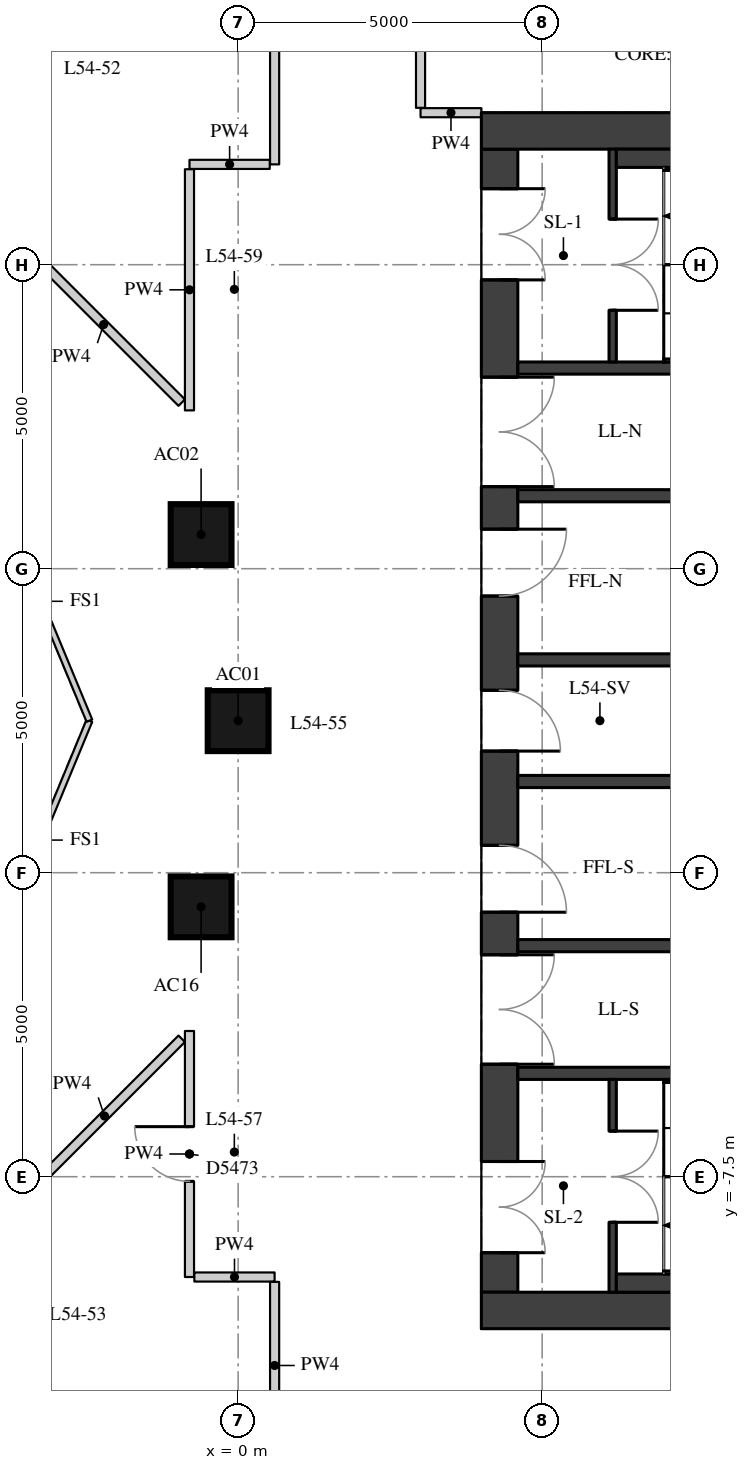
"""IFC4 building model, lengths in metres.
Left out: names, types, materials, properties, quantities, classifications, styles, units other than length and angle.
Written with IfcOpenShell. Run it as: python <this file> out.ifc"""

import sys

from ifc_helpers import new_model, si_unit, direction, frame, frame_2d, origin, origin_2d, place, context, subcontext, project, spatial, rectangle, extrude, element, fill, save


model = new_model("IFC4")
c1 = context("Model", 3, precision=1e-05, world=origin(), true_north=direction((0.0, 1.0)))
c2 = subcontext(c1, "Body", "Model", "MODEL_VIEW")
j1 = project(units=[si_unit("LENGTHUNIT", "METRE"), si_unit("PLANEANGLEUNIT", "RADIAN")], contexts=[c1])
p1 = place(None, origin())
s1 = spatial("IfcSite", under=j1, at=p1, CompositionType="ELEMENT")
p2 = place(p1, origin())
s2 = spatial("IfcBuilding", under=s1, at=p2, CompositionType="ELEMENT")
p3 = place(p2, frame((0.0, 0.0, 192.5)))
s3 = spatial("IfcBuildingStorey", under=s2, at=p3, CompositionType="ELEMENT", Elevation=192.5)
for number, where, z_axis, x_axis in (
    (1, (0.0, 0.0, 0.0), (0.0, 0.0, 1.0), (1.0, 0.0, 0.0)),
    (2, (-0.609, 3.062, 0.0), (0.0, 0.0, 1.0), (1.0, 0.0, 0.0)),
    (3, (-0.609, -3.062, 0.0), (0.0, 0.0, 1.0), (1.0, 0.0, 0.0)),
):
    element("IfcColumn", number, at=place(p3, frame(where, z_axis=z_axis, x_axis=x_axis)), inside=s3, PredefinedType="COLUMN", context=c2, shape_type="SweptSolid", body=[
        extrude(rectangle(XDim=1.0, YDim=1.0, at=origin_2d()), origin(), (0.0, 0.0, 1.0), 3.3),
    ])
p4 = place(p3, frame((4.3, -9.4, 0.0), z_axis=(0.0, 0.0, 1.0), x_axis=(0.0, 1.0, 0.0)))
e4 = element("IfcWall", 4, at=p4, inside=s3, PredefinedType="SHEAR", context=c2, shape_type="SweptSolid", body=[
    extrude(rectangle(XDim=18.8, YDim=0.6, at=frame_2d((9.4, 0.0))), origin(), (0.0, 0.0, 1.0), 3.02),
])
p5 = place(p4, frame((0.65, 0.0, 0.0)))
e5 = element("IfcOpeningElement", 5, at=p5, cuts=e4, PredefinedType="OPENING", context=c2, shape_type="SweptSolid", body=[
    extrude(rectangle(XDim=1.5, YDim=2.1, at=frame_2d((0.75, 1.05))), frame((0.0, 0.31, 0.0), z_axis=(0.0, -1.0, 0.0), x_axis=(1.0, 0.0, 0.0)), (0.0, 0.0, 1.0), 0.62),
])
p6 = place(p4, frame((3.75, 0.0, 0.0)))
e6 = element("IfcOpeningElement", 6, at=p6, cuts=e4, PredefinedType="OPENING", context=c2, shape_type="SweptSolid", body=[
    extrude(rectangle(XDim=1.8, YDim=2.1, at=frame_2d((0.9, 1.05))), frame((0.0, 0.31, 0.0), z_axis=(0.0, -1.0, 0.0), x_axis=(1.0, 0.0, 0.0)), (0.0, 0.0, 1.0), 0.62),
])
p7 = place(p4, frame((6.25, 0.0, 0.0)))
e7 = element("IfcOpeningElement", 7, at=p7, cuts=e4, PredefinedType="OPENING", context=c2, shape_type="SweptSolid", body=[
    extrude(rectangle(XDim=1.1, YDim=2.1, at=frame_2d((0.55, 1.05))), frame((0.0, 0.31, 0.0), z_axis=(0.0, -1.0, 0.0), x_axis=(1.0, 0.0, 0.0)), (0.0, 0.0, 1.0), 0.62),
])
p8 = place(p4, frame((8.9, 0.0, 0.0)))
e8 = element("IfcOpeningElement", 8, at=p8, cuts=e4, PredefinedType="OPENING", context=c2, shape_type="SweptSolid", body=[
    extrude(rectangle(XDim=1.0, YDim=2.1, at=frame_2d((0.5, 1.05))), frame((0.0, 0.31, 0.0), z_axis=(0.0, -1.0, 0.0), x_axis=(1.0, 0.0, 0.0)), (0.0, 0.0, 1.0), 0.62),
])
p9 = place(p4, frame((11.45, 0.0, 0.0)))
e9 = element("IfcOpeningElement", 9, at=p9, cuts=e4, PredefinedType="OPENING", context=c2, shape_type="SweptSolid", body=[
    extrude(rectangle(XDim=1.1, YDim=2.1, at=frame_2d((0.55, 1.05))), frame((0.0, 0.31, 0.0), z_axis=(0.0, -1.0, 0.0), x_axis=(1.0, 0.0, 0.0)), (0.0, 0.0, 1.0), 0.62),
])
p10 = place(p4, frame((13.25, 0.0, 0.0)))
e10 = element("IfcOpeningElement", 10, at=p10, cuts=e4, PredefinedType="OPENING", context=c2, shape_type="SweptSolid", body=[
    extrude(rectangle(XDim=1.8, YDim=2.1, at=frame_2d((0.9, 1.05))), frame((0.0, 0.31, 0.0), z_axis=(0.0, -1.0, 0.0), x_axis=(1.0, 0.0, 0.0)), (0.0, 0.0, 1.0), 0.62),
])
p11 = place(p4, frame((16.65, 0.0, 0.0)))
e11 = element("IfcOpeningElement", 11, at=p11, cuts=e4, PredefinedType="OPENING", context=c2, shape_type="SweptSolid", body=[
    extrude(rectangle(XDim=1.5, YDim=2.1, at=frame_2d((0.75, 1.05))), frame((0.0, 0.31, 0.0), z_axis=(0.0, -1.0, 0.0), x_axis=(1.0, 0.0, 0.0)), (0.0, 0.0, 1.0), 0.62),
])
for number, where, z_axis, x_axis in (
    (12, (4.0, 9.7, 0.0), (0.0, 0.0, 1.0), (1.0, 0.0, 0.0)),
    (13, (4.0, -9.7, 0.0), (0.0, 0.0, 1.0), (1.0, 0.0, 0.0)),
):
    element("IfcWall", number, at=place(p3, frame(where, z_axis=z_axis, x_axis=x_axis)), inside=s3, PredefinedType="SHEAR", context=c2, shape_type="SweptSolid", body=[
        extrude(rectangle(XDim=12.0, YDim=0.6, at=frame_2d((6.0, 0.0))), origin(), (0.0, 0.0, 1.0), 3.02),
    ])
p12 = place(p3, frame((4.6, 5.8, 0.0), z_axis=(0.0, 0.0, 1.0), x_axis=(1.0, 0.0, 0.0)))
e14 = element("IfcWall", 14, at=p12, inside=s3, PredefinedType="SHEAR", context=c2, shape_type="SweptSolid", body=[
    extrude(rectangle(XDim=10.8, YDim=0.2, at=frame_2d((5.4, 0.0))), origin(), (0.0, 0.0, 1.0), 3.02),
])
p13 = place(p12, frame((7.05, 0.0, 0.0)))
e15 = element("IfcOpeningElement", 15, at=p13, cuts=e14, PredefinedType="OPENING", context=c2, shape_type="SweptSolid", body=[
    extrude(rectangle(XDim=1.1, YDim=2.1, at=frame_2d((0.55, 1.05))), frame((0.0, 0.11, 0.0), z_axis=(0.0, -1.0, 0.0), x_axis=(1.0, 0.0, 0.0)), (0.0, 0.0, 1.0), 0.22),
])
p14 = place(p12, frame((9.05, 0.0, 0.0)))
e16 = element("IfcOpeningElement", 16, at=p14, cuts=e14, PredefinedType="OPENING", context=c2, shape_type="SweptSolid", body=[
    extrude(rectangle(XDim=1.1, YDim=2.1, at=frame_2d((0.55, 1.05))), frame((0.0, 0.11, 0.0), z_axis=(0.0, -1.0, 0.0), x_axis=(1.0, 0.0, 0.0)), (0.0, 0.0, 1.0), 0.22),
])
p15 = place(p3, frame((4.6, 3.7, 0.0), z_axis=(0.0, 0.0, 1.0), x_axis=(1.0, 0.0, 0.0)))
e17 = element("IfcWall", 17, at=p15, inside=s3, PredefinedType="SHEAR", context=c2, shape_type="SweptSolid", body=[
    extrude(rectangle(XDim=10.8, YDim=0.2, at=frame_2d((5.4, 0.0))), origin(), (0.0, 0.0, 1.0), 3.02),
])
p16 = place(p15, frame((6.6, 0.0, 0.0)))
e18 = element("IfcOpeningElement", 18, at=p16, cuts=e17, PredefinedType="OPENING", context=c2, shape_type="SweptSolid", body=[
    extrude(rectangle(XDim=1.1, YDim=2.1, at=frame_2d((0.55, 1.05))), frame((0.0, 0.11, 0.0), z_axis=(0.0, -1.0, 0.0), x_axis=(1.0, 0.0, 0.0)), (0.0, 0.0, 1.0), 0.22),
])
p17 = place(p15, frame((8.9, 0.0, 0.0)))
e19 = element("IfcOpeningElement", 19, at=p17, cuts=e17, PredefinedType="OPENING", context=c2, shape_type="SweptSolid", body=[
    extrude(rectangle(XDim=1.1, YDim=2.1, at=frame_2d((0.55, 1.05))), frame((0.0, 0.11, 0.0), z_axis=(0.0, -1.0, 0.0), x_axis=(1.0, 0.0, 0.0)), (0.0, 0.0, 1.0), 0.22),
])
for number, where, z_axis, x_axis in (
    (20, (4.6, 1.0, 0.0), (0.0, 0.0, 1.0), (1.0, 0.0, 0.0)),
    (21, (4.6, -1.0, 0.0), (0.0, 0.0, 1.0), (1.0, 0.0, 0.0)),
):
    element("IfcWall", number, at=place(p3, frame(where, z_axis=z_axis, x_axis=x_axis)), inside=s3, PredefinedType="SHEAR", context=c2, shape_type="SweptSolid", body=[
        extrude(rectangle(XDim=10.8, YDim=0.2, at=frame_2d((5.4, 0.0))), origin(), (0.0, 0.0, 1.0), 3.02),
    ])
p18 = place(p3, frame((4.6, -3.7, 0.0), z_axis=(0.0, 0.0, 1.0), x_axis=(1.0, 0.0, 0.0)))
e22 = element("IfcWall", 22, at=p18, inside=s3, PredefinedType="SHEAR", context=c2, shape_type="SweptSolid", body=[
    extrude(rectangle(XDim=10.8, YDim=0.2, at=frame_2d((5.4, 0.0))), origin(), (0.0, 0.0, 1.0), 3.02),
])
p19 = place(p18, frame((6.6, 0.0, 0.0)))
e23 = element("IfcOpeningElement", 23, at=p19, cuts=e22, PredefinedType="OPENING", context=c2, shape_type="SweptSolid", body=[
    extrude(rectangle(XDim=1.1, YDim=2.1, at=frame_2d((0.55, 1.05))), frame((0.0, 0.11, 0.0), z_axis=(0.0, -1.0, 0.0), x_axis=(1.0, 0.0, 0.0)), (0.0, 0.0, 1.0), 0.22),
])
p20 = place(p18, frame((8.9, 0.0, 0.0)))
e24 = element("IfcOpeningElement", 24, at=p20, cuts=e22, PredefinedType="OPENING", context=c2, shape_type="SweptSolid", body=[
    extrude(rectangle(XDim=1.1, YDim=2.1, at=frame_2d((0.55, 1.05))), frame((0.0, 0.11, 0.0), z_axis=(0.0, -1.0, 0.0), x_axis=(1.0, 0.0, 0.0)), (0.0, 0.0, 1.0), 0.22),
])
p21 = place(p3, frame((4.6, -5.8, 0.0), z_axis=(0.0, 0.0, 1.0), x_axis=(1.0, 0.0, 0.0)))
e25 = element("IfcWall", 25, at=p21, inside=s3, PredefinedType="SHEAR", context=c2, shape_type="SweptSolid", body=[
    extrude(rectangle(XDim=10.8, YDim=0.2, at=frame_2d((5.4, 0.0))), origin(), (0.0, 0.0, 1.0), 3.02),
])
p22 = place(p3, frame((6.16, 5.9, 0.0), z_axis=(0.0, 0.0, 1.0), x_axis=(0.0, 1.0, 0.0)))
e26 = element("IfcWall", 26, at=p22, inside=s3, PredefinedType="SHEAR", context=c2, shape_type="SweptSolid", body=[
    extrude(rectangle(XDim=3.5, YDim=0.12, at=frame_2d((1.75, 0.0))), origin(), (0.0, 0.0, 1.0), 3.02),
])
p23 = place(p22, frame((0.85, 0.0, 0.0)))
e27 = element("IfcOpeningElement", 27, at=p23, cuts=e26, PredefinedType="OPENING", context=c2, shape_type="SweptSolid", body=[
    extrude(rectangle(XDim=1.5, YDim=2.1, at=frame_2d((0.75, 1.05))), frame((0.0, 0.07, 0.0), z_axis=(0.0, -1.0, 0.0), x_axis=(1.0, 0.0, 0.0)), (0.0, 0.0, 1.0), 0.14),
])
p24 = place(p3, frame((6.16, -9.4, 0.0), z_axis=(0.0, 0.0, 1.0), x_axis=(0.0, 1.0, 0.0)))
e28 = element("IfcWall", 28, at=p24, inside=s3, PredefinedType="SHEAR", context=c2, shape_type="SweptSolid", body=[
    extrude(rectangle(XDim=3.5, YDim=0.12, at=frame_2d((1.75, 0.0))), origin(), (0.0, 0.0, 1.0), 3.02),
])
p25 = place(p24, frame((1.15, 0.0, 0.0)))
e29 = element("IfcOpeningElement", 29, at=p25, cuts=e28, PredefinedType="OPENING", context=c2, shape_type="SweptSolid", body=[
    extrude(rectangle(XDim=1.5, YDim=2.1, at=frame_2d((0.75, 1.05))), frame((0.0, 0.07, 0.0), z_axis=(0.0, -1.0, 0.0), x_axis=(1.0, 0.0, 0.0)), (0.0, 0.0, 1.0), 0.14),
])
for number, where, z_axis, x_axis in (
    (30, (6.22, 9.25, 0.0), (0.0, 0.0, 1.0), (1.0, 0.0, 0.0)),
    (31, (6.22, -9.25, 0.0), (0.0, 0.0, 1.0), (1.0, 0.0, 0.0)),
):
    element("IfcWall", number, at=place(p3, frame(where, z_axis=z_axis, x_axis=x_axis)), inside=s3, PredefinedType="PARTITIONING", context=c2, shape_type="SweptSolid", body=[
        extrude(rectangle(XDim=4.88, YDim=0.3, at=frame_2d((2.44, 0.0))), origin(), (0.0, 0.0, 1.0), 3.02),
    ])
p26 = place(p3, frame((4.001, 10.0, 0.0), z_axis=(0.0, 0.0, 1.0), x_axis=(-1.0, 0.0, 0.0)))
e32 = element("IfcWall", 32, at=p26, inside=s3, PredefinedType="PARTITIONING", context=c2, shape_type="SweptSolid", body=[
    extrude(rectangle(XDim=1.001, YDim=0.15, at=frame_2d((0.5, 0.0))), origin(), (0.0, 0.0, 1.0), 3.02),
])
p27 = place(p3, frame((3.0, 10.08, 0.0), z_axis=(0.0, 0.0, 1.0), x_axis=(0.0, 1.0, 0.0)))
e33 = element("IfcWall", 33, at=p27, inside=s3, PredefinedType="PARTITIONING", context=c2, shape_type="SweptSolid", body=[
    extrude(rectangle(XDim=2.742, YDim=0.15, at=frame_2d((1.371, 0.0))), origin(), (0.0, 0.0, 1.0), 3.02),
])
p28 = place(p3, frame((0.6, 13.7, 0.0), z_axis=(0.0, 0.0, 1.0), x_axis=(0.0, -1.0, 0.0)))
e34 = element("IfcWall", 34, at=p28, inside=s3, PredefinedType="PARTITIONING", context=c2, shape_type="SweptSolid", body=[
    extrude(rectangle(XDim=4.55, YDim=0.15, at=frame_2d((2.275, 0.0))), origin(), (0.0, 0.0, 1.0), 3.02),
])
p29 = place(p3, frame((0.52, 9.15, 0.0), z_axis=(0.0, 0.0, 1.0), x_axis=(-1.0, 0.0, 0.0)))
e35 = element("IfcWall", 35, at=p29, inside=s3, PredefinedType="PARTITIONING", context=c2, shape_type="SweptSolid", body=[
    extrude(rectangle(XDim=1.32, YDim=0.15, at=frame_2d((0.66, 0.0))), origin(), (0.0, 0.0, 1.0), 3.02),
])
p30 = place(p3, frame((-0.8, 9.07, 0.0), z_axis=(0.0, 0.0, 1.0), x_axis=(0.0, -1.0, 0.0)))
e36 = element("IfcWall", 36, at=p30, inside=s3, PredefinedType="PARTITIONING", context=c2, shape_type="SweptSolid", body=[
    extrude(rectangle(XDim=3.966, YDim=0.15, at=frame_2d((1.983, 0.0))), origin(), (0.0, 0.0, 1.0), 3.02),
])
p31 = place(p3, frame((-0.927, 5.231, 0.0), z_axis=(0.0, 0.0, 1.0), x_axis=(-0.707106781187, 0.707106781187, 0.0)))
e37 = element("IfcWall", 37, at=p31, inside=s3, PredefinedType="PARTITIONING", context=c2, shape_type="SweptSolid", body=[
    extrude(rectangle(XDim=3.633, YDim=0.15, at=frame_2d((1.817, 0.0))), origin(), (0.0, 0.0, 1.0), 3.02),
])
p32 = place(p3, frame((-0.8, -5.104, 0.0), z_axis=(0.0, 0.0, 1.0), x_axis=(0.0, -1.0, 0.0)))
e38 = element("IfcWall", 38, at=p32, inside=s3, PredefinedType="PARTITIONING", context=c2, shape_type="SweptSolid", body=[
    extrude(rectangle(XDim=4.046, YDim=0.15, at=frame_2d((2.023, 0.0))), origin(), (0.0, 0.0, 1.0), 3.02),
])
p33 = place(p32, frame((1.573, 0.0, 0.0)))
e39 = element("IfcOpeningElement", 39, at=p33, cuts=e38, PredefinedType="OPENING", context=c2, shape_type="SweptSolid", body=[
    extrude(rectangle(XDim=0.9, YDim=2.1, at=frame_2d((0.45, 1.05))), frame((0.0, 0.085, 0.0), z_axis=(0.0, -1.0, 0.0), x_axis=(1.0, 0.0, 0.0)), (0.0, 0.0, 1.0), 0.17),
])
p34 = place(p3, frame((-0.72, -9.15, 0.0), z_axis=(0.0, 0.0, 1.0), x_axis=(1.0, 0.0, 0.0)))
e40 = element("IfcWall", 40, at=p34, inside=s3, PredefinedType="PARTITIONING", context=c2, shape_type="SweptSolid", body=[
    extrude(rectangle(XDim=1.32, YDim=0.15, at=frame_2d((0.66, 0.0))), origin(), (0.0, 0.0, 1.0), 3.02),
])
p35 = place(p3, frame((0.6, -9.23, 0.0), z_axis=(0.0, 0.0, 1.0), x_axis=(0.0, -1.0, 0.0)))
e41 = element("IfcWall", 41, at=p35, inside=s3, PredefinedType="PARTITIONING", context=c2, shape_type="SweptSolid", body=[
    extrude(rectangle(XDim=2.75, YDim=0.15, at=frame_2d((1.375, 0.0))), origin(), (0.0, 0.0, 1.0), 3.02),
])
p36 = place(p3, frame((-3.468, -7.772, 0.0), z_axis=(0.0, 0.0, 1.0), x_axis=(0.707106781187, 0.707106781187, 0.0)))
e42 = element("IfcWall", 42, at=p36, inside=s3, PredefinedType="PARTITIONING", context=c2, shape_type="SweptSolid", body=[
    extrude(rectangle(XDim=3.593, YDim=0.15, at=frame_2d((1.797, 0.0))), origin(), (0.0, 0.0, 1.0), 3.02),
])
for number, where, z_axis, x_axis in (
    (43, (-2.446, 0.0, 0.0), (0.0, 0.0, 1.0), (-0.383, -0.924, 0.0)),
    (44, (-4.073, 3.927, 0.0), (0.0, 0.0, 1.0), (0.383, -0.924, 0.0)),
):
    element("IfcWall", number, at=place(p3, frame(where, z_axis=z_axis, x_axis=x_axis)), inside=s3, PredefinedType="PARTITIONING", context=c2, shape_type="SweptSolid", body=[
        extrude(rectangle(XDim=4.251, YDim=0.1, at=frame_2d((2.125, 0.0))), origin(), (0.0, 0.0, 1.0), 3.02),
    ])
p37 = place(p5, origin())
e45 = element("IfcDoor", 45, at=p37, inside=s3, OperationType="DOUBLE_DOOR_SINGLE_SWING", PredefinedType="DOOR", context=c2, shape_type="SweptSolid", body=[
    extrude(rectangle(XDim=1.5, YDim=2.1, at=frame_2d((0.75, 1.05))), frame((0.0, 0.025, 0.0), z_axis=(0.0, -1.0, 0.0), x_axis=(1.0, 0.0, 0.0)), (0.0, 0.0, 1.0), 0.05),
])
fill(e5, e45)
p38 = place(p6, origin())
e46 = element("IfcDoor", 46, at=p38, inside=s3, OperationType="DOUBLE_DOOR_SINGLE_SWING", PredefinedType="DOOR", context=c2, shape_type="SweptSolid", body=[
    extrude(rectangle(XDim=1.8, YDim=2.1, at=frame_2d((0.9, 1.05))), frame((0.0, 0.025, 0.0), z_axis=(0.0, -1.0, 0.0), x_axis=(1.0, 0.0, 0.0)), (0.0, 0.0, 1.0), 0.05),
])
fill(e6, e46)
p39 = place(p7, origin())
e47 = element("IfcDoor", 47, at=p39, inside=s3, OperationType="SINGLE_SWING_RIGHT", PredefinedType="DOOR", context=c2, shape_type="SweptSolid", body=[
    extrude(rectangle(XDim=1.1, YDim=2.1, at=frame_2d((0.55, 1.05))), frame((0.0, 0.025, 0.0), z_axis=(0.0, -1.0, 0.0), x_axis=(1.0, 0.0, 0.0)), (0.0, 0.0, 1.0), 0.05),
])
fill(e7, e47)
p40 = place(p8, origin())
e48 = element("IfcDoor", 48, at=p40, inside=s3, OperationType="SINGLE_SWING_RIGHT", PredefinedType="DOOR", context=c2, shape_type="SweptSolid", body=[
    extrude(rectangle(XDim=1.0, YDim=2.1, at=frame_2d((0.5, 1.05))), frame((0.0, 0.025, 0.0), z_axis=(0.0, -1.0, 0.0), x_axis=(1.0, 0.0, 0.0)), (0.0, 0.0, 1.0), 0.05),
])
fill(e8, e48)
p41 = place(p9, origin())
e49 = element("IfcDoor", 49, at=p41, inside=s3, OperationType="SINGLE_SWING_LEFT", PredefinedType="DOOR", context=c2, shape_type="SweptSolid", body=[
    extrude(rectangle(XDim=1.1, YDim=2.1, at=frame_2d((0.55, 1.05))), frame((0.0, 0.025, 0.0), z_axis=(0.0, -1.0, 0.0), x_axis=(1.0, 0.0, 0.0)), (0.0, 0.0, 1.0), 0.05),
])
fill(e9, e49)
p42 = place(p10, origin())
e50 = element("IfcDoor", 50, at=p42, inside=s3, OperationType="DOUBLE_DOOR_SINGLE_SWING", PredefinedType="DOOR", context=c2, shape_type="SweptSolid", body=[
    extrude(rectangle(XDim=1.8, YDim=2.1, at=frame_2d((0.9, 1.05))), frame((0.0, 0.025, 0.0), z_axis=(0.0, -1.0, 0.0), x_axis=(1.0, 0.0, 0.0)), (0.0, 0.0, 1.0), 0.05),
])
fill(e10, e50)
p43 = place(p11, origin())
e51 = element("IfcDoor", 51, at=p43, inside=s3, OperationType="DOUBLE_DOOR_SINGLE_SWING", PredefinedType="DOOR", context=c2, shape_type="SweptSolid", body=[
    extrude(rectangle(XDim=1.5, YDim=2.1, at=frame_2d((0.75, 1.05))), frame((0.0, 0.025, 0.0), z_axis=(0.0, -1.0, 0.0), x_axis=(1.0, 0.0, 0.0)), (0.0, 0.0, 1.0), 0.05),
])
fill(e11, e51)
p44 = place(p23, origin())
e52 = element("IfcDoor", 52, at=p44, inside=s3, OperationType="DOUBLE_DOOR_SINGLE_SWING", PredefinedType="DOOR", context=c2, shape_type="SweptSolid", body=[
    extrude(rectangle(XDim=1.5, YDim=2.1, at=frame_2d((0.75, 1.05))), frame((0.0, 0.025, 0.0), z_axis=(0.0, -1.0, 0.0), x_axis=(1.0, 0.0, 0.0)), (0.0, 0.0, 1.0), 0.05),
])
fill(e27, e52)
p45 = place(p25, origin())
e53 = element("IfcDoor", 53, at=p45, inside=s3, OperationType="DOUBLE_DOOR_SINGLE_SWING", PredefinedType="DOOR", context=c2, shape_type="SweptSolid", body=[
    extrude(rectangle(XDim=1.5, YDim=2.1, at=frame_2d((0.75, 1.05))), frame((0.0, 0.025, 0.0), z_axis=(0.0, -1.0, 0.0), x_axis=(1.0, 0.0, 0.0)), (0.0, 0.0, 1.0), 0.05),
])
fill(e29, e53)
p46 = place(p33, origin())
e54 = element("IfcDoor", 54, at=p46, inside=s3, OperationType="SINGLE_SWING_RIGHT", PredefinedType="DOOR", context=c2, shape_type="SweptSolid", body=[
    extrude(rectangle(XDim=0.9, YDim=2.1, at=frame_2d((0.45, 1.05))), frame((0.0, 0.025, 0.0), z_axis=(0.0, -1.0, 0.0), x_axis=(1.0, 0.0, 0.0)), (0.0, 0.0, 1.0), 0.05),
])
fill(e39, e54)
save(model, sys.argv[1])
